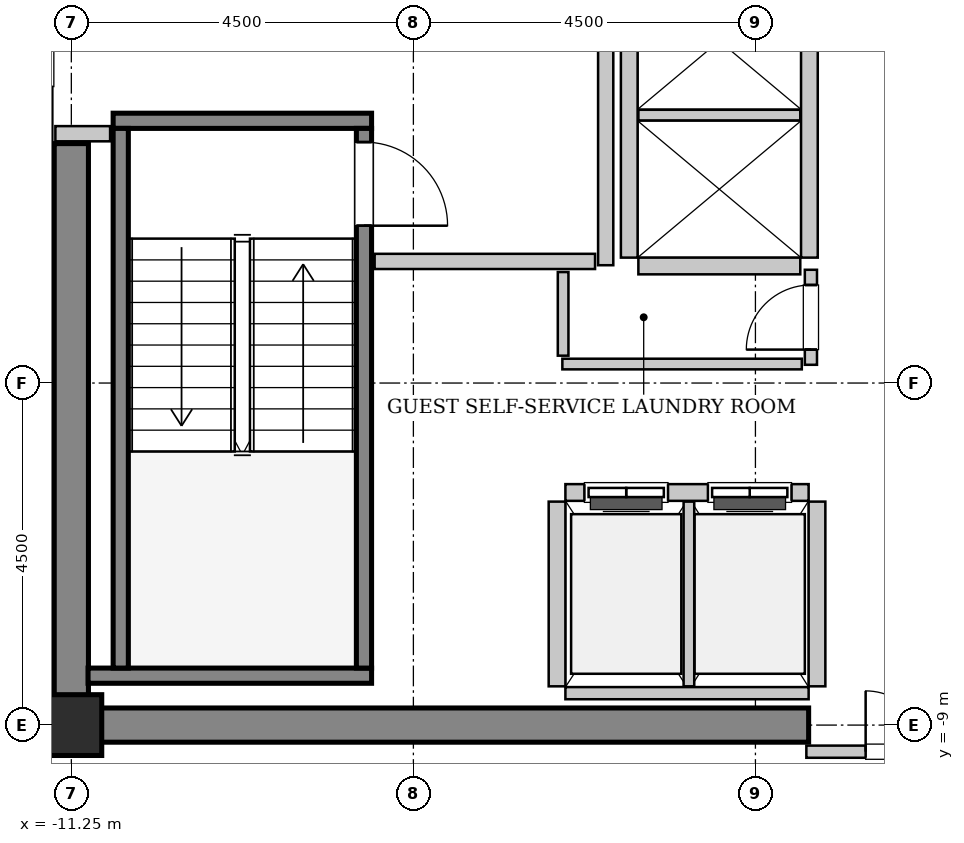
"""IFC4 building model, lengths in metres.
Left out: names, types, materials, properties, quantities, classifications, styles, units other than length and angle.
Written with IfcOpenShell. Run it as: python <this file> out.ifc"""

import sys

from ifc_helpers import new_model, si_unit, direction, frame, frame_2d, origin, origin_2d, place, context, subcontext, project, spatial, rectangle, hollow_rectangle, extrude, source, transform, mapped, element, fill, save


model = new_model("IFC4")
c1 = context("Model", 3, precision=1e-05, world=origin(), true_north=direction((0.0, 1.0)))
c2 = subcontext(c1, "Body", "Model", "MODEL_VIEW")
j1 = project(units=[si_unit("LENGTHUNIT", "METRE"), si_unit("PLANEANGLEUNIT", "RADIAN")], contexts=[c1])
p1 = place(None, origin())
s1 = spatial("IfcSite", under=j1, at=p1, CompositionType="ELEMENT")
p2 = place(p1, origin())
s2 = spatial("IfcBuilding", under=s1, at=p2, CompositionType="ELEMENT")
p3 = place(p2, frame((0.0, 0.0, 233.2)))
s3 = spatial("IfcBuildingStorey", under=s2, at=p3, CompositionType="ELEMENT", Elevation=233.2)
m1 = source(origin(), c2, "Body", "SweptSolid", [
    extrude(rectangle(XDim=9.925, YDim=0.45, at=frame_2d((4.962, 0.0))), origin(), (0.0, 0.0, 1.0), 3.8),
])
p4 = place(p3, frame((-11.475, -9.0, 0.0), z_axis=(0.0, 0.0, 1.0), x_axis=(1.0, 0.0, 0.0)))
e1 = element("IfcWall", 1, at=p4, inside=s3, PredefinedType="SHEAR", context=c2, shape_type="MappedRepresentation", body=[
    mapped(m1, transform((0.0, 0.0, 0.0), x_axis=(1.0, 0.0, 0.0), y_axis=(0.0, 1.0, 0.0), z_axis=(0.0, 0.0, 1.0), scale=1.0)),
])
m2 = source(origin(), c2, "Body", "SweptSolid", [
    extrude(rectangle(XDim=7.425, YDim=0.45, at=frame_2d((3.712, 0.0))), origin(), (0.0, 0.0, 1.0), 3.8),
])
p5 = place(p3, frame((-11.25, -8.775, 0.0), z_axis=(0.0, 0.0, 1.0), x_axis=(0.0, 1.0, 0.0)))
e2 = element("IfcWall", 2, at=p5, inside=s3, PredefinedType="SHEAR", context=c2, shape_type="MappedRepresentation", body=[
    mapped(m2, transform((0.0, 0.0, 0.0), x_axis=(1.0, 0.0, 0.0), y_axis=(0.0, 1.0, 0.0), z_axis=(0.0, 0.0, 1.0), scale=1.0)),
])
m3 = source(origin(), c2, "Body", "SweptSolid", [
    extrude(hollow_rectangle(XDim=0.8, YDim=0.8, WallThickness=0.04, InnerFilletRadius=0.04, OuterFilletRadius=0.08, at=origin_2d()), origin(), (0.0, 0.0, 1.0), 3.8),
])
p6 = place(p3, frame((-11.25, -9.0, 0.0), z_axis=(0.0, 0.0, 1.0), x_axis=(1.0, 0.0, 0.0)))
e3 = element("IfcColumn", 3, at=p6, inside=s3, PredefinedType="COLUMN", context=c2, shape_type="MappedRepresentation", body=[
    mapped(m3, transform((0.0, 0.0, 0.0), x_axis=(1.0, 0.0, 0.0), y_axis=(0.0, 1.0, 0.0), z_axis=(0.0, 0.0, 1.0), scale=1.0)),
])
m4 = source(origin(), c2, "Body", "SweptSolid", [
    extrude(rectangle(XDim=3.4, YDim=0.2, at=frame_2d((1.7, 0.0))), origin(), (0.0, 0.0, 1.0), 3.8),
])
p7 = place(p3, frame((-10.7, -1.05, 0.0), z_axis=(0.0, 0.0, 1.0), x_axis=(1.0, 0.0, 0.0)))
e4 = element("IfcWall", 4, at=p7, inside=s3, PredefinedType="SOLIDWALL", context=c2, shape_type="MappedRepresentation", body=[
    mapped(m4, transform((0.0, 0.0, 0.0), x_axis=(1.0, 0.0, 0.0), y_axis=(0.0, 1.0, 0.0), z_axis=(0.0, 0.0, 1.0), scale=1.0)),
])
m5 = source(origin(), c2, "Body", "SweptSolid", [
    extrude(rectangle(XDim=3.73, YDim=0.2, at=frame_2d((1.865, 0.0))), origin(), (0.0, 0.0, 1.0), 3.8),
])
p8 = place(p3, frame((-11.03, -8.35, 0.0), z_axis=(0.0, 0.0, 1.0), x_axis=(1.0, 0.0, 0.0)))
e5 = element("IfcWall", 5, at=p8, inside=s3, PredefinedType="SOLIDWALL", context=c2, shape_type="MappedRepresentation", body=[
    mapped(m5, transform((0.0, 0.0, 0.0), x_axis=(1.0, 0.0, 0.0), y_axis=(0.0, 1.0, 0.0), z_axis=(0.0, 0.0, 1.0), scale=1.0)),
])
m6 = source(origin(), c2, "Body", "SweptSolid", [
    extrude(rectangle(XDim=7.1, YDim=0.2, at=frame_2d((3.55, 0.0))), origin(), (0.0, 0.0, 1.0), 3.8),
])
p9 = place(p3, frame((-10.6, -1.15, 0.0), z_axis=(0.0, 0.0, 1.0), x_axis=(0.0, -1.0, 0.0)))
e6 = element("IfcWall", 6, at=p9, inside=s3, PredefinedType="SOLIDWALL", context=c2, shape_type="MappedRepresentation", body=[
    mapped(m6, transform((0.0, 0.0, 0.0), x_axis=(1.0, 0.0, 0.0), y_axis=(0.0, 1.0, 0.0), z_axis=(0.0, 0.0, 1.0), scale=1.0)),
])
p10 = place(p3, frame((-7.4, -1.15, 0.0), z_axis=(0.0, 0.0, 1.0), x_axis=(0.0, -1.0, 0.0)))
e7 = element("IfcWall", 7, at=p10, inside=s3, PredefinedType="SOLIDWALL", context=c2, shape_type="MappedRepresentation", body=[
    mapped(m6, transform((0.0, 0.0, 0.0), x_axis=(1.0, 0.0, 0.0), y_axis=(0.0, 1.0, 0.0), z_axis=(0.0, 0.0, 1.0), scale=1.0)),
])
p11 = place(p10, frame((0.18, 0.0, 0.0)))
e8 = element("IfcOpeningElement", 8, at=p11, cuts=e7, PredefinedType="OPENING", context=c2, shape_type="SweptSolid", body=[
    extrude(rectangle(XDim=1.1, YDim=2.15, at=frame_2d((0.55, 1.075))), frame((0.0, 0.11, 0.0), z_axis=(0.0, -1.0, 0.0), x_axis=(1.0, 0.0, 0.0)), (0.0, 0.0, 1.0), 0.22),
])
m7 = source(origin(), c2, "Body", "SweptSolid", [
    extrude(rectangle(XDim=3.2, YDim=0.22, at=frame_2d((1.6, 0.0))), origin(), (0.0, 0.0, 1.0), 3.535),
])
p12 = place(p3, frame((-1.55, -5.94, 0.0), z_axis=(0.0, 0.0, 1.0), x_axis=(-1.0, 0.0, 0.0)))
e9 = element("IfcWall", 9, at=p12, inside=s3, PredefinedType="SOLIDWALL", context=c2, shape_type="MappedRepresentation", body=[
    mapped(m7, transform((0.0, 0.0, 0.0), x_axis=(1.0, 0.0, 0.0), y_axis=(0.0, 1.0, 0.0), z_axis=(0.0, 0.0, 1.0), scale=1.0)),
])
p13 = place(p12, frame((1.85, 0.0, 0.0)))
e10 = element("IfcOpeningElement", 10, at=p13, cuts=e9, PredefinedType="OPENING", context=c2, shape_type="SweptSolid", body=[
    extrude(rectangle(XDim=1.1, YDim=2.2, at=frame_2d((0.55, 1.1))), frame((0.0, 0.12, 0.0), z_axis=(0.0, -1.0, 0.0), x_axis=(1.0, 0.0, 0.0)), (0.0, 0.0, 1.0), 0.24),
])
p14 = place(p12, frame((0.225, 0.0, 0.0)))
e11 = element("IfcOpeningElement", 11, at=p14, cuts=e9, PredefinedType="OPENING", context=c2, shape_type="SweptSolid", body=[
    extrude(rectangle(XDim=1.1, YDim=2.2, at=frame_2d((0.55, 1.1))), frame((0.0, 0.12, 0.0), z_axis=(0.0, -1.0, 0.0), x_axis=(1.0, 0.0, 0.0)), (0.0, 0.0, 1.0), 0.24),
])
m8 = source(origin(), c2, "Body", "SweptSolid", [
    extrude(rectangle(XDim=3.2, YDim=0.16, at=frame_2d((1.6, 0.0))), origin(), (0.0, 0.0, 1.0), 2.625),
])
p15 = place(p3, frame((-4.75, -8.58, 0.0), z_axis=(0.0, 0.0, 1.0), x_axis=(1.0, 0.0, 0.0)))
e12 = element("IfcWall", 12, at=p15, inside=s3, PredefinedType="PARTITIONING", context=c2, shape_type="MappedRepresentation", body=[
    mapped(m8, transform((0.0, 0.0, 0.0), x_axis=(1.0, 0.0, 0.0), y_axis=(0.0, 1.0, 0.0), z_axis=(0.0, 0.0, 1.0), scale=1.0)),
])
m9 = source(origin(), c2, "Body", "SweptSolid", [
    extrude(rectangle(XDim=2.43, YDim=0.22, at=frame_2d((1.215, 0.0))), origin(), (0.0, 0.0, 1.0), 3.535),
])
p16 = place(p3, frame((-4.86, -6.06, 0.0), z_axis=(0.0, 0.0, 1.0), x_axis=(0.0, -1.0, 0.0)))
e13 = element("IfcWall", 13, at=p16, inside=s3, PredefinedType="SOLIDWALL", context=c2, shape_type="MappedRepresentation", body=[
    mapped(m9, transform((0.0, 0.0, 0.0), x_axis=(1.0, 0.0, 0.0), y_axis=(0.0, 1.0, 0.0), z_axis=(0.0, 0.0, 1.0), scale=1.0)),
])
m10 = source(origin(), c2, "Body", "SweptSolid", [
    extrude(rectangle(XDim=2.43, YDim=0.14, at=frame_2d((1.215, 0.0))), origin(), (0.0, 0.0, 1.0), 3.535),
])
p17 = place(p3, frame((-3.125, -8.49, 0.0), z_axis=(0.0, 0.0, 1.0), x_axis=(0.0, 1.0, 0.0)))
e14 = element("IfcWall", 14, at=p17, inside=s3, PredefinedType="PARTITIONING", context=c2, shape_type="MappedRepresentation", body=[
    mapped(m10, transform((0.0, 0.0, 0.0), x_axis=(1.0, 0.0, 0.0), y_axis=(0.0, 1.0, 0.0), z_axis=(0.0, 0.0, 1.0), scale=1.0)),
])
p18 = place(p3, frame((-1.44, -8.49, 0.0), z_axis=(0.0, 0.0, 1.0), x_axis=(0.0, 1.0, 0.0)))
e15 = element("IfcWall", 15, at=p18, inside=s3, PredefinedType="SOLIDWALL", context=c2, shape_type="MappedRepresentation", body=[
    mapped(m9, transform((0.0, 0.0, 0.0), x_axis=(1.0, 0.0, 0.0), y_axis=(0.0, 1.0, 0.0), z_axis=(0.0, 0.0, 1.0), scale=1.0)),
])
m11 = source(origin(), c2, "Body", "SweptSolid", [
    extrude(rectangle(XDim=5.7, YDim=0.22, at=frame_2d((2.85, 0.0))), origin(), (0.0, 0.0, 1.0), 3.535),
])
for number, where, z_axis, x_axis in (
    (16, (-1.54, -2.85, 0.0), (0.0, 0.0, 1.0), (0.0, 1.0, 0.0)),
    (17, (-3.91, 2.85, 0.0), (0.0, 0.0, 1.0), (0.0, -1.0, 0.0)),
):
    element("IfcWall", number, at=place(p3, frame(where, z_axis=z_axis, x_axis=x_axis)), inside=s3, PredefinedType="SOLIDWALL", context=c2, shape_type="MappedRepresentation", body=[
        mapped(m11, transform((0.0, 0.0, 0.0), x_axis=(1.0, 0.0, 0.0), y_axis=(0.0, 1.0, 0.0), z_axis=(0.0, 0.0, 1.0), scale=1.0)),
    ])
m12 = source(origin(), c2, "Body", "SweptSolid", [
    extrude(rectangle(XDim=2.13, YDim=0.22, at=frame_2d((1.065, 0.0))), origin(), (0.0, 0.0, 1.0), 3.535),
])
p19 = place(p3, frame((-3.79, -2.96, 0.0), z_axis=(0.0, 0.0, 1.0), x_axis=(1.0, 0.0, 0.0)))
e18 = element("IfcWall", 18, at=p19, inside=s3, PredefinedType="SOLIDWALL", context=c2, shape_type="MappedRepresentation", body=[
    mapped(m12, transform((0.0, 0.0, 0.0), x_axis=(1.0, 0.0, 0.0), y_axis=(0.0, 1.0, 0.0), z_axis=(0.0, 0.0, 1.0), scale=1.0)),
])
m13 = source(origin(), c2, "Body", "SweptSolid", [
    extrude(rectangle(XDim=2.13, YDim=0.14, at=frame_2d((1.065, 0.0))), origin(), (0.0, 0.0, 1.0), 3.535),
])
p20 = place(p3, frame((-3.79, -0.975, 0.0), z_axis=(0.0, 0.0, 1.0), x_axis=(1.0, 0.0, 0.0)))
e19 = element("IfcWall", 19, at=p20, inside=s3, PredefinedType="PARTITIONING", context=c2, shape_type="MappedRepresentation", body=[
    mapped(m13, transform((0.0, 0.0, 0.0), x_axis=(1.0, 0.0, 0.0), y_axis=(0.0, 1.0, 0.0), z_axis=(0.0, 0.0, 1.0), scale=1.0)),
])
m14 = source(origin(), c2, "Body", "SweptSolid", [
    extrude(rectangle(XDim=5.9, YDim=0.2, at=frame_2d((2.95, 0.0))), origin(), (0.0, 0.0, 1.0), 3.535),
])
p21 = place(p3, frame((-4.22, -2.95, 0.0), z_axis=(0.0, 0.0, 1.0), x_axis=(0.0, 1.0, 0.0)))
e20 = element("IfcWall", 20, at=p21, inside=s3, PredefinedType="PARTITIONING", context=c2, shape_type="MappedRepresentation", body=[
    mapped(m14, transform((0.0, 0.0, 0.0), x_axis=(1.0, 0.0, 0.0), y_axis=(0.0, 1.0, 0.0), z_axis=(0.0, 0.0, 1.0), scale=1.0)),
])
m15 = source(origin(), c2, "Body", "SweptSolid", [
    extrude(rectangle(XDim=2.9, YDim=0.2, at=frame_2d((1.45, 0.0))), origin(), (0.0, 0.0, 1.0), 3.535),
])
p22 = place(p3, frame((-7.26, -2.9, 0.0), z_axis=(0.0, 0.0, 1.0), x_axis=(1.0, 0.0, 0.0)))
e21 = element("IfcWall", 21, at=p22, inside=s3, PredefinedType="PARTITIONING", context=c2, shape_type="MappedRepresentation", body=[
    mapped(m15, transform((0.0, 0.0, 0.0), x_axis=(1.0, 0.0, 0.0), y_axis=(0.0, 1.0, 0.0), z_axis=(0.0, 0.0, 1.0), scale=1.0)),
])
m16 = source(origin(), c2, "Body", "SweptSolid", [
    extrude(rectangle(XDim=0.72, YDim=0.2, at=frame_2d((0.36, 0.0))), origin(), (0.0, 0.0, 1.0), 3.535),
])
p23 = place(p3, frame((-11.46, -1.22, 0.0), z_axis=(0.0, 0.0, 1.0), x_axis=(1.0, 0.0, 0.0)))
e22 = element("IfcWall", 22, at=p23, inside=s3, PredefinedType="PARTITIONING", context=c2, shape_type="MappedRepresentation", body=[
    mapped(m16, transform((0.0, 0.0, 0.0), x_axis=(1.0, 0.0, 0.0), y_axis=(0.0, 1.0, 0.0), z_axis=(0.0, 0.0, 1.0), scale=1.0)),
])
m17 = source(origin(), c2, "Body", "SweptSolid", [
    extrude(rectangle(XDim=3.16, YDim=0.16, at=frame_2d((1.58, 0.0))), origin(), (0.0, 0.0, 1.0), 2.625),
])
p24 = place(p3, frame((-1.58, -9.35, 0.0), z_axis=(0.0, 0.0, 1.0), x_axis=(1.0, 0.0, 0.0)))
e23 = element("IfcWall", 23, at=p24, inside=s3, PredefinedType="PARTITIONING", context=c2, shape_type="MappedRepresentation", body=[
    mapped(m17, transform((0.0, 0.0, 0.0), x_axis=(1.0, 0.0, 0.0), y_axis=(0.0, 1.0, 0.0), z_axis=(0.0, 0.0, 1.0), scale=1.0)),
])
p25 = place(p24, frame((0.78, 0.0, 0.0)))
e24 = element("IfcOpeningElement", 24, at=p25, cuts=e23, PredefinedType="OPENING", context=c2, shape_type="SweptSolid", body=[
    extrude(rectangle(XDim=1.6, YDim=2.3, at=frame_2d((0.8, 1.15))), frame((0.0, 0.09, 0.0), z_axis=(0.0, -1.0, 0.0), x_axis=(1.0, 0.0, 0.0)), (0.0, 0.0, 1.0), 0.18),
])
m18 = source(origin(), c2, "Body", "SweptSolid", [
    extrude(rectangle(XDim=1.25, YDim=0.16, at=frame_2d((0.625, 0.0))), origin(), (0.0, 0.0, 1.0), 3.535),
])
p26 = place(p3, frame((-1.52, -4.26, 0.0), z_axis=(0.0, 0.0, 1.0), x_axis=(0.0, 1.0, 0.0)))
e25 = element("IfcWall", 25, at=p26, inside=s3, PredefinedType="PARTITIONING", context=c2, shape_type="MappedRepresentation", body=[
    mapped(m18, transform((0.0, 0.0, 0.0), x_axis=(1.0, 0.0, 0.0), y_axis=(0.0, 1.0, 0.0), z_axis=(0.0, 0.0, 1.0), scale=1.0)),
])
p27 = place(p26, frame((0.2, 0.0, 0.0)))
e26 = element("IfcOpeningElement", 26, at=p27, cuts=e25, PredefinedType="OPENING", context=c2, shape_type="SweptSolid", body=[
    extrude(rectangle(XDim=0.85, YDim=2.1, at=frame_2d((0.425, 1.05))), frame((0.0, 0.09, 0.0), z_axis=(0.0, -1.0, 0.0), x_axis=(1.0, 0.0, 0.0)), (0.0, 0.0, 1.0), 0.18),
])
m19 = source(origin(), c2, "Body", "SweptSolid", [
    extrude(rectangle(XDim=3.15, YDim=0.14, at=frame_2d((1.575, 0.0))), origin(), (0.0, 0.0, 1.0), 3.535),
])
p28 = place(p3, frame((-4.79, -4.25, 0.0), z_axis=(0.0, 0.0, 1.0), x_axis=(1.0, 0.0, 0.0)))
e27 = element("IfcWall", 27, at=p28, inside=s3, PredefinedType="PARTITIONING", context=c2, shape_type="MappedRepresentation", body=[
    mapped(m19, transform((0.0, 0.0, 0.0), x_axis=(1.0, 0.0, 0.0), y_axis=(0.0, 1.0, 0.0), z_axis=(0.0, 0.0, 1.0), scale=1.0)),
])
m20 = source(origin(), c2, "Body", "SweptSolid", [
    extrude(rectangle(XDim=1.1, YDim=0.14, at=frame_2d((0.55, 0.0))), origin(), (0.0, 0.0, 1.0), 3.535),
])
p29 = place(p3, frame((-4.78, -4.14, 0.0), z_axis=(0.0, 0.0, 1.0), x_axis=(0.0, 1.0, 0.0)))
e28 = element("IfcWall", 28, at=p29, inside=s3, PredefinedType="PARTITIONING", context=c2, shape_type="MappedRepresentation", body=[
    mapped(m20, transform((0.0, 0.0, 0.0), x_axis=(1.0, 0.0, 0.0), y_axis=(0.0, 1.0, 0.0), z_axis=(0.0, 0.0, 1.0), scale=1.0)),
])
m21 = source(origin(), c2, "Body", "SweptSolid", [
    extrude(rectangle(XDim=1.1, YDim=2.15, at=frame_2d((0.55, 1.075))), frame((0.0, 0.025, 0.0), z_axis=(0.0, -1.0, 0.0), x_axis=(1.0, 0.0, 0.0)), (0.0, 0.0, 1.0), 0.05),
])
p30 = place(p11, origin())
e29 = element("IfcDoor", 29, at=p30, inside=s3, OperationType="SINGLE_SWING_RIGHT", PredefinedType="DOOR", context=c2, shape_type="MappedRepresentation", body=[
    mapped(m21, transform((0.0, 0.0, 0.0), x_axis=(1.0, 0.0, 0.0), y_axis=(0.0, 1.0, 0.0), z_axis=(0.0, 0.0, 1.0), scale=1.0)),
])
fill(e8, e29)
m22 = source(origin(), c2, "Body", "SweptSolid", [
    extrude(rectangle(XDim=1.1, YDim=2.2, at=frame_2d((0.55, 1.1))), frame((0.0, 0.025, 0.0), z_axis=(0.0, -1.0, 0.0), x_axis=(1.0, 0.0, 0.0)), (0.0, 0.0, 1.0), 0.05),
])
p31 = place(p13, origin())
e30 = element("IfcDoor", 30, at=p31, inside=s3, OperationType="DOUBLE_DOOR_SLIDING", PredefinedType="DOOR", context=c2, shape_type="MappedRepresentation", body=[
    mapped(m22, transform((0.0, 0.0, 0.0), x_axis=(1.0, 0.0, 0.0), y_axis=(0.0, 1.0, 0.0), z_axis=(0.0, 0.0, 1.0), scale=1.0)),
])
fill(e10, e30)
p32 = place(p14, origin())
e31 = element("IfcDoor", 31, at=p32, inside=s3, OperationType="DOUBLE_DOOR_SLIDING", PredefinedType="DOOR", context=c2, shape_type="MappedRepresentation", body=[
    mapped(m22, transform((0.0, 0.0, 0.0), x_axis=(1.0, 0.0, 0.0), y_axis=(0.0, 1.0, 0.0), z_axis=(0.0, 0.0, 1.0), scale=1.0)),
])
fill(e11, e31)
m23 = source(origin(), c2, "Body", "SweptSolid", [
    extrude(rectangle(XDim=1.6, YDim=2.3, at=frame_2d((0.8, 1.15))), frame((0.0, 0.025, 0.0), z_axis=(0.0, -1.0, 0.0), x_axis=(1.0, 0.0, 0.0)), (0.0, 0.0, 1.0), 0.05),
])
p33 = place(p25, origin())
e32 = element("IfcDoor", 32, at=p33, inside=s3, OperationType="DOUBLE_DOOR_SINGLE_SWING", PredefinedType="DOOR", context=c2, shape_type="MappedRepresentation", body=[
    mapped(m23, transform((0.0, 0.0, 0.0), x_axis=(1.0, 0.0, 0.0), y_axis=(0.0, 1.0, 0.0), z_axis=(0.0, 0.0, 1.0), scale=1.0)),
])
fill(e24, e32)
m24 = source(origin(), c2, "Body", "SweptSolid", [
    extrude(rectangle(XDim=0.85, YDim=2.1, at=frame_2d((0.425, 1.05))), frame((0.0, 0.025, 0.0), z_axis=(0.0, -1.0, 0.0), x_axis=(1.0, 0.0, 0.0)), (0.0, 0.0, 1.0), 0.05),
])
p34 = place(p27, origin())
e33 = element("IfcDoor", 33, at=p34, inside=s3, OperationType="SINGLE_SWING_LEFT", PredefinedType="DOOR", context=c2, shape_type="MappedRepresentation", body=[
    mapped(m24, transform((0.0, 0.0, 0.0), x_axis=(1.0, 0.0, 0.0), y_axis=(0.0, 1.0, 0.0), z_axis=(0.0, 0.0, 1.0), scale=1.0)),
])
fill(e26, e33)
save(model, sys.argv[1])
